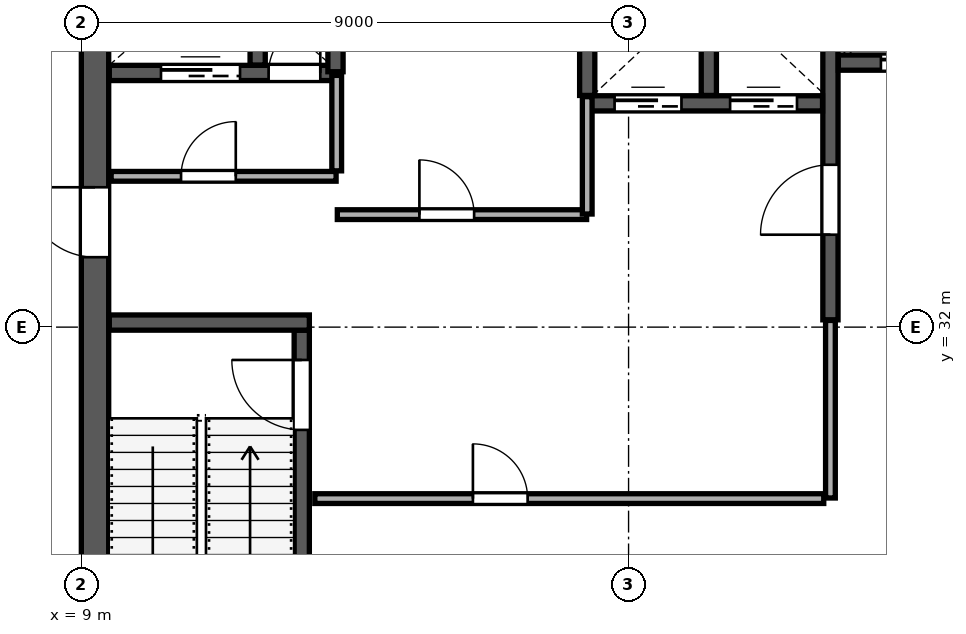
"""IFC4 building model, lengths in metres.
Left out: names, types, materials, properties, quantities, classifications, styles, units other than length and angle.
Written with IfcOpenShell. Run it as: python <this file> out.ifc"""

import sys

from ifc_helpers import new_model, si_unit, direction, frame, frame_2d, origin, place, context, subcontext, project, spatial, rectangle, extrude, source, transform, mapped, element, fill, save


model = new_model("IFC4")
c1 = context("Model", 3, precision=1e-05, world=origin(), true_north=direction((0.0, 1.0)))
c2 = subcontext(c1, "Body", "Model", "MODEL_VIEW")
j1 = project(units=[si_unit("LENGTHUNIT", "METRE"), si_unit("PLANEANGLEUNIT", "RADIAN")], contexts=[c1])
p1 = place(None, origin())
s1 = spatial("IfcSite", under=j1, at=p1, CompositionType="ELEMENT")
p2 = place(p1, origin())
s2 = spatial("IfcBuilding", under=s1, at=p2, CompositionType="ELEMENT")
p3 = place(p2, frame((0.0, 0.0, 262.6)))
s3 = spatial("IfcBuildingStorey", under=s2, at=p3, CompositionType="ELEMENT", Elevation=262.6)
p4 = place(p3, frame((9.225, 24.45, 0.0), z_axis=(0.0, 0.0, 1.0), x_axis=(0.0, 1.0, 0.0)))
e1 = element("IfcWall", 1, at=p4, inside=s3, PredefinedType="SHEAR", context=c2, shape_type="SweptSolid", body=[
    extrude(rectangle(XDim=15.1, YDim=0.45, at=frame_2d((7.55, 0.0))), origin(), (0.0, 0.0, 1.0), 3.96),
])
p5 = place(p4, frame((8.7, 0.0, 0.0)))
e2 = element("IfcOpeningElement", 2, at=p5, cuts=e1, PredefinedType="OPENING", context=c2, shape_type="SweptSolid", body=[
    extrude(rectangle(XDim=1.15, YDim=2.2, at=frame_2d((0.575, 1.1))), frame((0.0, 0.235, 0.0), z_axis=(0.0, -1.0, 0.0), x_axis=(1.0, 0.0, 0.0)), (0.0, 0.0, 1.0), 0.47),
])
p6 = place(p3, frame((12.625, 24.46, 0.0), z_axis=(0.0, 0.0, 1.0), x_axis=(0.0, 1.0, 0.0)))
e3 = element("IfcWall", 3, at=p6, inside=s3, PredefinedType="SHEAR", context=c2, shape_type="SweptSolid", body=[
    extrude(rectangle(XDim=7.49, YDim=0.25, at=frame_2d((3.745, 0.0))), origin(), (0.0, 0.0, 1.0), 3.96),
])
p7 = place(p6, frame((5.85, 0.0, 0.0)))
e4 = element("IfcOpeningElement", 4, at=p7, cuts=e3, PredefinedType="OPENING", context=c2, shape_type="SweptSolid", body=[
    extrude(rectangle(XDim=1.15, YDim=2.2, at=frame_2d((0.575, 1.1))), frame((0.0, 0.135, 0.0), z_axis=(0.0, -1.0, 0.0), x_axis=(1.0, 0.0, 0.0)), (0.0, 0.0, 1.0), 0.27),
])
p8 = place(p3, frame((9.46, 32.075, 0.0), z_axis=(0.0, 0.0, 1.0), x_axis=(1.0, 0.0, 0.0)))
e5 = element("IfcWall", 5, at=p8, inside=s3, PredefinedType="SHEAR", context=c2, shape_type="SweptSolid", body=[
    extrude(rectangle(XDim=3.29, YDim=0.25, at=frame_2d((1.645, 0.0))), origin(), (0.0, 0.0, 1.0), 3.96),
])
p9 = place(p3, frame((21.32, 32.12, 0.0), z_axis=(0.0, 0.0, 1.0), x_axis=(0.0, 1.0, 0.0)))
e6 = element("IfcWall", 6, at=p9, inside=s3, PredefinedType="SHEAR", context=c2, shape_type="SweptSolid", body=[
    extrude(rectangle(XDim=7.42, YDim=0.25, at=frame_2d((3.71, 0.0))), origin(), (0.0, 0.0, 1.0), 3.96),
])
p10 = place(p9, frame((1.4, 0.0, 0.0)))
e7 = element("IfcOpeningElement", 7, at=p10, cuts=e6, PredefinedType="OPENING", context=c2, shape_type="SweptSolid", body=[
    extrude(rectangle(XDim=1.15, YDim=2.2, at=frame_2d((0.575, 1.1))), frame((0.0, 0.135, 0.0), z_axis=(0.0, -1.0, 0.0), x_axis=(1.0, 0.0, 0.0)), (0.0, 0.0, 1.0), 0.27),
])
p11 = place(p3, frame((9.46, 36.18, 0.0), z_axis=(0.0, 0.0, 1.0), x_axis=(1.0, 0.0, 0.0)))
e8 = element("IfcWall", 8, at=p11, inside=s3, PredefinedType="SHEAR", context=c2, shape_type="SweptSolid", body=[
    extrude(rectangle(XDim=3.79, YDim=0.25, at=frame_2d((1.895, 0.0))), origin(), (0.0, 0.0, 1.0), 3.96),
])
p12 = place(p11, frame((2.62, 0.0, 0.0)))
e9 = element("IfcOpeningElement", 9, at=p12, cuts=e8, PredefinedType="OPENING", context=c2, shape_type="SweptSolid", body=[
    extrude(rectangle(XDim=0.85, YDim=2.1, at=frame_2d((0.425, 1.05))), frame((0.0, 0.135, 0.0), z_axis=(0.0, -1.0, 0.0), x_axis=(1.0, 0.0, 0.0)), (0.0, 0.0, 1.0), 0.27),
])
p13 = place(p11, frame((0.85, 0.0, 0.0)))
e10 = element("IfcOpeningElement", 10, at=p13, cuts=e8, PredefinedType="OPENING", context=c2, shape_type="SweptSolid", body=[
    extrude(rectangle(XDim=1.3, YDim=2.25, at=frame_2d((0.65, 1.125))), frame((0.0, 0.135, 0.0), z_axis=(0.0, -1.0, 0.0), x_axis=(1.0, 0.0, 0.0)), (0.0, 0.0, 1.0), 0.27),
])
p14 = place(p3, frame((11.9, 36.31, 0.0), z_axis=(0.0, 0.0, 1.0), x_axis=(0.0, 1.0, 0.0)))
e11 = element("IfcWall", 11, at=p14, inside=s3, PredefinedType="SHEAR", context=c2, shape_type="SweptSolid", body=[
    extrude(rectangle(XDim=3.23, YDim=0.25, at=frame_2d((1.615, 0.0))), origin(), (0.0, 0.0, 1.0), 3.96),
])
p15 = place(p3, frame((21.45, 36.35, 0.0), z_axis=(0.0, 0.0, 1.0), x_axis=(1.0, 0.0, 0.0)))
e12 = element("IfcWall", 12, at=p15, inside=s3, PredefinedType="SHEAR", context=c2, shape_type="SweptSolid", body=[
    extrude(rectangle(XDim=5.09, YDim=0.25, at=frame_2d((2.545, 0.0))), origin(), (0.0, 0.0, 1.0), 3.96),
])
p16 = place(p15, frame((0.7, 0.0, 0.0)))
e13 = element("IfcOpeningElement", 13, at=p16, cuts=e12, PredefinedType="OPENING", context=c2, shape_type="SweptSolid", body=[
    extrude(rectangle(XDim=1.2, YDim=2.2, at=frame_2d((0.6, 1.1))), frame((0.0, 0.135, 0.0), z_axis=(0.0, -1.0, 0.0), x_axis=(1.0, 0.0, 0.0)), (0.0, 0.0, 1.0), 0.27),
])
p17 = place(p15, frame((3.25, 0.0, 0.0)))
e14 = element("IfcOpeningElement", 14, at=p17, cuts=e12, PredefinedType="OPENING", context=c2, shape_type="SweptSolid", body=[
    extrude(rectangle(XDim=1.2, YDim=2.2, at=frame_2d((0.6, 1.1))), frame((0.0, 0.135, 0.0), z_axis=(0.0, -1.0, 0.0), x_axis=(1.0, 0.0, 0.0)), (0.0, 0.0, 1.0), 0.27),
])
p18 = place(p3, frame((13.18, 36.2, 0.0), z_axis=(0.0, 0.0, 1.0), x_axis=(0.0, 1.0, 0.0)))
e15 = element("IfcWall", 15, at=p18, inside=s3, PredefinedType="SHEAR", context=c2, shape_type="SweptSolid", body=[
    extrude(rectangle(XDim=3.34, YDim=0.25, at=frame_2d((1.67, 0.0))), origin(), (0.0, 0.0, 1.0), 3.96),
])
p19 = place(p3, frame((17.32, 35.68, 0.0), z_axis=(0.0, 0.0, 1.0), x_axis=(1.0, 0.0, 0.0)))
e16 = element("IfcWall", 16, at=p19, inside=s3, PredefinedType="SHEAR", context=c2, shape_type="SweptSolid", body=[
    extrude(rectangle(XDim=3.87, YDim=0.25, at=frame_2d((1.935, 0.0))), origin(), (0.0, 0.0, 1.0), 3.96),
])
p20 = place(p19, frame((0.45, 0.0, 0.0)))
e17 = element("IfcOpeningElement", 17, at=p20, cuts=e16, PredefinedType="OPENING", context=c2, shape_type="SweptSolid", body=[
    extrude(rectangle(XDim=1.1, YDim=2.2, at=frame_2d((0.55, 1.1))), frame((0.0, 0.135, 0.0), z_axis=(0.0, -1.0, 0.0), x_axis=(1.0, 0.0, 0.0)), (0.0, 0.0, 1.0), 0.27),
])
p21 = place(p19, frame((2.35, 0.0, 0.0)))
e18 = element("IfcOpeningElement", 18, at=p21, cuts=e16, PredefinedType="OPENING", context=c2, shape_type="SweptSolid", body=[
    extrude(rectangle(XDim=1.1, YDim=2.2, at=frame_2d((0.55, 1.1))), frame((0.0, 0.135, 0.0), z_axis=(0.0, -1.0, 0.0), x_axis=(1.0, 0.0, 0.0)), (0.0, 0.0, 1.0), 0.27),
])
for number, where, z_axis, x_axis in (
    (19, (17.32, 35.81, 0.0), (0.0, 0.0, 1.0), (0.0, 1.0, 0.0)),
    (20, (19.32, 35.81, 0.0), (0.0, 0.0, 1.0), (0.0, 1.0, 0.0)),
):
    element("IfcWall", number, at=place(p3, frame(where, z_axis=z_axis, x_axis=x_axis)), inside=s3, PredefinedType="SHEAR", context=c2, shape_type="SweptSolid", body=[
        extrude(rectangle(XDim=3.73, YDim=0.25, at=frame_2d((1.865, 0.0))), origin(), (0.0, 0.0, 1.0), 3.96),
    ])
p22 = place(p3, frame((9.49, 34.48, 0.0), z_axis=(0.0, 0.0, 1.0), x_axis=(1.0, 0.0, 0.0)))
e21 = element("IfcWall", 21, at=p22, inside=s3, PredefinedType="PARTITIONING", context=c2, shape_type="SweptSolid", body=[
    extrude(rectangle(XDim=3.7, YDim=0.16, at=frame_2d((1.85, 0.0))), origin(), (0.0, 0.0, 1.0), 3.96),
])
p23 = place(p22, frame((1.15, 0.0, 0.0)))
e22 = element("IfcOpeningElement", 22, at=p23, cuts=e21, PredefinedType="OPENING", context=c2, shape_type="SweptSolid", body=[
    extrude(rectangle(XDim=0.9, YDim=2.15, at=frame_2d((0.45, 1.075))), frame((0.0, 0.09, 0.0), z_axis=(0.0, -1.0, 0.0), x_axis=(1.0, 0.0, 0.0)), (0.0, 0.0, 1.0), 0.18),
])
p24 = place(p3, frame((13.2, 34.57, 0.0), z_axis=(0.0, 0.0, 1.0), x_axis=(0.0, 1.0, 0.0)))
e23 = element("IfcWall", 23, at=p24, inside=s3, PredefinedType="PARTITIONING", context=c2, shape_type="SweptSolid", body=[
    extrude(rectangle(XDim=1.57, YDim=0.16, at=frame_2d((0.785, 0.0))), origin(), (0.0, 0.0, 1.0), 3.96),
])
p25 = place(p3, frame((13.21, 33.85, 0.0), z_axis=(0.0, 0.0, 1.0), x_axis=(1.0, 0.0, 0.0)))
e24 = element("IfcWall", 24, at=p25, inside=s3, PredefinedType="PARTITIONING", context=c2, shape_type="SweptSolid", body=[
    extrude(rectangle(XDim=4.1, YDim=0.16, at=frame_2d((2.05, 0.0))), origin(), (0.0, 0.0, 1.0), 3.96),
])
p26 = place(p25, frame((1.35, 0.0, 0.0)))
e25 = element("IfcOpeningElement", 25, at=p26, cuts=e24, PredefinedType="OPENING", context=c2, shape_type="SweptSolid", body=[
    extrude(rectangle(XDim=0.9, YDim=2.15, at=frame_2d((0.45, 1.075))), frame((0.0, 0.09, 0.0), z_axis=(0.0, -1.0, 0.0), x_axis=(1.0, 0.0, 0.0)), (0.0, 0.0, 1.0), 0.18),
])
p27 = place(p3, frame((17.32, 33.86, 0.0), z_axis=(0.0, 0.0, 1.0), x_axis=(0.0, 1.0, 0.0)))
e26 = element("IfcWall", 26, at=p27, inside=s3, PredefinedType="PARTITIONING", context=c2, shape_type="SweptSolid", body=[
    extrude(rectangle(XDim=1.93, YDim=0.16, at=frame_2d((0.965, 0.0))), origin(), (0.0, 0.0, 1.0), 3.96),
])
p28 = place(p3, frame((12.84, 29.18, 0.0), z_axis=(0.0, 0.0, 1.0), x_axis=(1.0, 0.0, 0.0)))
e27 = element("IfcWall", 27, at=p28, inside=s3, PredefinedType="PARTITIONING", context=c2, shape_type="SweptSolid", body=[
    extrude(rectangle(XDim=8.37, YDim=0.16, at=frame_2d((4.185, 0.0))), origin(), (0.0, 0.0, 1.0), 3.96),
])
p29 = place(p28, frame((2.6, 0.0, 0.0)))
e28 = element("IfcOpeningElement", 28, at=p29, cuts=e27, PredefinedType="OPENING", context=c2, shape_type="SweptSolid", body=[
    extrude(rectangle(XDim=0.9, YDim=2.15, at=frame_2d((0.45, 1.075))), frame((0.0, 0.09, 0.0), z_axis=(0.0, -1.0, 0.0), x_axis=(1.0, 0.0, 0.0)), (0.0, 0.0, 1.0), 0.18),
])
p30 = place(p3, frame((21.32, 29.19, 0.0), z_axis=(0.0, 0.0, 1.0), x_axis=(0.0, 1.0, 0.0)))
e29 = element("IfcWall", 29, at=p30, inside=s3, PredefinedType="PARTITIONING", context=c2, shape_type="SweptSolid", body=[
    extrude(rectangle(XDim=2.92, YDim=0.16, at=frame_2d((1.46, 0.0))), origin(), (0.0, 0.0, 1.0), 3.96),
])
p31 = place(p3, frame((4.203, 28.778, 0.0), z_axis=(0.0, 0.0, 1.0), x_axis=(0.675591041558, -0.737276572642, 0.0)))
e30 = element("IfcWall", 30, at=p31, inside=s3, PredefinedType="PARTITIONING", context=c2, shape_type="SweptSolid", body=[
    extrude(rectangle(XDim=14.07, YDim=0.16, at=frame_2d((7.035, 0.0))), origin(), (0.0, 0.0, 1.0), 3.96),
])
p32 = place(p31, frame((1.15, 0.0, 0.0)))
e31 = element("IfcOpeningElement", 31, at=p32, cuts=e30, PredefinedType="OPENING", context=c2, shape_type="SweptSolid", body=[
    extrude(rectangle(XDim=0.95, YDim=2.15, at=frame_2d((0.475, 1.075))), frame((0.0, 0.09, 0.0), z_axis=(0.0, -1.0, 0.0), x_axis=(1.0, 0.0, 0.0)), (0.0, 0.0, 1.0), 0.18),
])
p33 = place(p3, frame((19.042, 50.92, 0.0), z_axis=(0.0, 0.0, 1.0), x_axis=(0.675589646996, -0.737277850523, 0.0)))
e32 = element("IfcWall", 32, at=p33, inside=s3, PredefinedType="PARTITIONING", context=c2, shape_type="SweptSolid", body=[
    extrude(rectangle(XDim=21.87, YDim=0.135, at=frame_2d((10.935, 0.0))), origin(), (0.0, 0.0, 1.0), 3.96),
])
p34 = place(p33, frame((5.4, 0.0, 0.0)))
e33 = element("IfcOpeningElement", 33, at=p34, cuts=e32, PredefinedType="OPENING", context=c2, shape_type="SweptSolid", body=[
    extrude(rectangle(XDim=0.95, YDim=2.15, at=frame_2d((0.475, 1.075))), frame((0.0, 0.078, 0.0), z_axis=(0.0, -1.0, 0.0), x_axis=(1.0, 0.0, 0.0)), (0.0, 0.0, 1.0), 0.155),
])
p35 = place(p33, frame((9.4, 0.0, 0.0)))
e34 = element("IfcOpeningElement", 34, at=p35, cuts=e32, PredefinedType="OPENING", context=c2, shape_type="SweptSolid", body=[
    extrude(rectangle(XDim=0.95, YDim=2.15, at=frame_2d((0.475, 1.075))), frame((0.0, 0.078, 0.0), z_axis=(0.0, -1.0, 0.0), x_axis=(1.0, 0.0, 0.0)), (0.0, 0.0, 1.0), 0.155),
])
p36 = place(p3, frame((1.393, 34.124, 0.0), z_axis=(0.0, 0.0, 1.0), x_axis=(0.737274323436, 0.675593496121, 0.0)))
e35 = element("IfcWall", 35, at=p36, inside=s3, PredefinedType="PARTITIONING", context=c2, shape_type="SweptSolid", body=[
    extrude(rectangle(XDim=27.402, YDim=0.135, at=frame_2d((13.701, 0.0))), origin(), (0.0, 0.0, 1.0), 3.96),
])
m1 = source(origin(), c2, "Body", "SweptSolid", [
    extrude(rectangle(XDim=1.15, YDim=2.2, at=frame_2d((0.575, 1.1))), frame((0.0, 0.025, 0.0), z_axis=(0.0, -1.0, 0.0), x_axis=(1.0, 0.0, 0.0)), (0.0, 0.0, 1.0), 0.05),
])
p37 = place(p7, origin())
e36 = element("IfcDoor", 36, at=p37, inside=s3, OperationType="SINGLE_SWING_RIGHT", PredefinedType="DOOR", context=c2, shape_type="MappedRepresentation", body=[
    mapped(m1, transform((0.0, 0.0, 0.0), scale=1.0)),
])
fill(e4, e36)
m2 = source(origin(), c2, "Body", "SweptSolid", [
    extrude(rectangle(XDim=1.15, YDim=2.2, at=frame_2d((0.575, 1.1))), frame((0.0, 0.025, 0.0), z_axis=(0.0, -1.0, 0.0), x_axis=(1.0, 0.0, 0.0)), (0.0, 0.0, 1.0), 0.05),
])
p38 = place(p10, origin())
e37 = element("IfcDoor", 37, at=p38, inside=s3, OperationType="SINGLE_SWING_LEFT", PredefinedType="DOOR", context=c2, shape_type="MappedRepresentation", body=[
    mapped(m2, transform((0.0, 0.0, 0.0), scale=1.0)),
])
fill(e7, e37)
p39 = place(p5, origin())
e38 = element("IfcDoor", 38, at=p39, inside=s3, OperationType="SINGLE_SWING_RIGHT", PredefinedType="DOOR", context=c2, shape_type="MappedRepresentation", body=[
    mapped(m2, transform((0.0, 0.0, 0.0), scale=1.0)),
])
fill(e2, e38)
m3 = source(origin(), c2, "Body", "SweptSolid", [
    extrude(rectangle(XDim=0.85, YDim=2.1, at=frame_2d((0.425, 1.05))), frame((0.0, 0.025, 0.0), z_axis=(0.0, -1.0, 0.0), x_axis=(1.0, 0.0, 0.0)), (0.0, 0.0, 1.0), 0.05),
])
p40 = place(p12, origin())
e39 = element("IfcDoor", 39, at=p40, inside=s3, OperationType="SINGLE_SWING_RIGHT", PredefinedType="DOOR", context=c2, shape_type="MappedRepresentation", body=[
    mapped(m3, transform((0.0, 0.0, 0.0), scale=1.0)),
])
fill(e9, e39)
m4 = source(origin(), c2, "Body", "SweptSolid", [
    extrude(rectangle(XDim=1.1, YDim=2.2, at=frame_2d((0.55, 1.1))), frame((0.0, 0.025, 0.0), z_axis=(0.0, -1.0, 0.0), x_axis=(1.0, 0.0, 0.0)), (0.0, 0.0, 1.0), 0.05),
])
p41 = place(p20, origin())
e40 = element("IfcDoor", 40, at=p41, inside=s3, OperationType="SLIDING_TO_LEFT", PredefinedType="DOOR", context=c2, shape_type="MappedRepresentation", body=[
    mapped(m4, transform((0.0, 0.0, 0.0), scale=1.0)),
])
fill(e17, e40)
p42 = place(p21, origin())
e41 = element("IfcDoor", 41, at=p42, inside=s3, OperationType="SLIDING_TO_RIGHT", PredefinedType="DOOR", context=c2, shape_type="MappedRepresentation", body=[
    mapped(m4, transform((0.0, 0.0, 0.0), scale=1.0)),
])
fill(e18, e41)
m5 = source(origin(), c2, "Body", "SweptSolid", [
    extrude(rectangle(XDim=1.2, YDim=2.2, at=frame_2d((0.6, 1.1))), frame((0.0, 0.025, 0.0), z_axis=(0.0, -1.0, 0.0), x_axis=(1.0, 0.0, 0.0)), (0.0, 0.0, 1.0), 0.05),
])
p43 = place(p16, origin())
e42 = element("IfcDoor", 42, at=p43, inside=s3, OperationType="SLIDING_TO_LEFT", PredefinedType="DOOR", context=c2, shape_type="MappedRepresentation", body=[
    mapped(m5, transform((0.0, 0.0, 0.0), scale=1.0)),
])
fill(e13, e42)
m6 = source(origin(), c2, "Body", "SweptSolid", [
    extrude(rectangle(XDim=1.3, YDim=2.25, at=frame_2d((0.65, 1.125))), frame((0.0, 0.025, 0.0), z_axis=(0.0, -1.0, 0.0), x_axis=(1.0, 0.0, 0.0)), (0.0, 0.0, 1.0), 0.05),
])
p44 = place(p13, origin())
e43 = element("IfcDoor", 43, at=p44, inside=s3, OperationType="SLIDING_TO_LEFT", PredefinedType="DOOR", context=c2, shape_type="MappedRepresentation", body=[
    mapped(m6, transform((0.0, 0.0, 0.0), scale=1.0)),
])
fill(e10, e43)
m7 = source(origin(), c2, "Body", "SweptSolid", [
    extrude(rectangle(XDim=0.9, YDim=2.15, at=frame_2d((0.45, 1.075))), frame((0.0, 0.025, 0.0), z_axis=(0.0, -1.0, 0.0), x_axis=(1.0, 0.0, 0.0)), (0.0, 0.0, 1.0), 0.05),
])
p45 = place(p23, origin())
e44 = element("IfcDoor", 44, at=p45, inside=s3, OperationType="SINGLE_SWING_RIGHT", PredefinedType="DOOR", context=c2, shape_type="MappedRepresentation", body=[
    mapped(m7, transform((0.0, 0.0, 0.0), scale=1.0)),
])
fill(e22, e44)
p46 = place(p26, origin())
e45 = element("IfcDoor", 45, at=p46, inside=s3, OperationType="SINGLE_SWING_LEFT", PredefinedType="DOOR", context=c2, shape_type="MappedRepresentation", body=[
    mapped(m7, transform((0.0, 0.0, 0.0), scale=1.0)),
])
fill(e25, e45)
p47 = place(p29, origin())
e46 = element("IfcDoor", 46, at=p47, inside=s3, OperationType="SINGLE_SWING_LEFT", PredefinedType="DOOR", context=c2, shape_type="MappedRepresentation", body=[
    mapped(m7, transform((0.0, 0.0, 0.0), scale=1.0)),
])
fill(e28, e46)
save(model, sys.argv[1])
